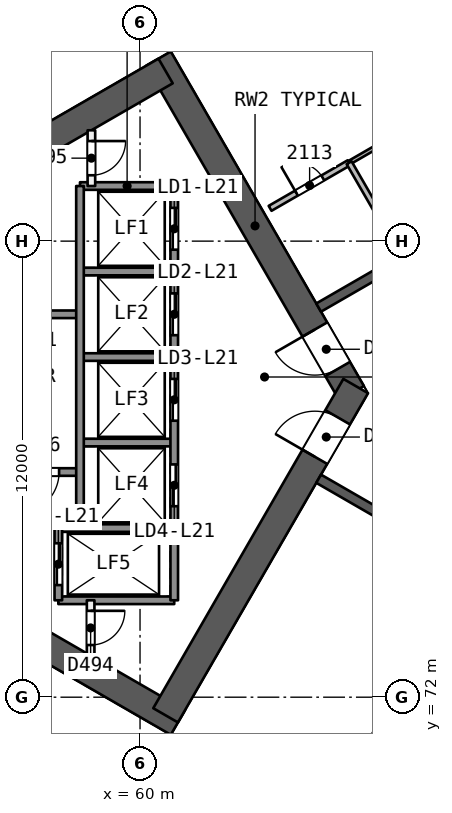
"""IFC4 building model, lengths in metres.
Left out: names, types, materials, properties, quantities, classifications, styles, units other than length and angle.
Written with IfcOpenShell. Run it as: python <this file> out.ifc"""

import sys

from ifc_helpers import new_model, si_unit, direction, frame, frame_2d, origin, place, context, subcontext, project, spatial, rectangle, extrude, element, fill, save


model = new_model("IFC4")
c1 = context("Model", 3, precision=1e-05, world=origin(), true_north=direction((0.0, 1.0)))
c2 = subcontext(c1, "Body", "Model", "MODEL_VIEW")
j1 = project(units=[si_unit("LENGTHUNIT", "METRE"), si_unit("PLANEANGLEUNIT", "RADIAN")], contexts=[c1])
p1 = place(None, origin())
s1 = spatial("IfcSite", under=j1, at=p1, CompositionType="ELEMENT")
p2 = place(p1, origin())
s2 = spatial("IfcBuilding", under=s1, at=p2, CompositionType="ELEMENT")
p3 = place(p2, frame((0.0, 0.0, 90.6)))
s3 = spatial("IfcBuildingStorey", under=s2, at=p3, CompositionType="ELEMENT", Elevation=90.6)
p4 = place(p3, frame((65.567, 80.0, 0.0), z_axis=(0.0, 0.0, 1.0), x_axis=(-0.499988615364, 0.866031976607, 0.0)))
e1 = element("IfcWall", 1, at=p4, inside=s3, PredefinedType="SHEAR", context=c2, shape_type="SweptSolid", body=[
    extrude(rectangle(XDim=10.163, YDim=0.75, at=frame_2d((5.082, 0.0))), origin(), (0.0, 0.0, 1.0), 3.7),
])
p5 = place(p4, frame((0.733, 0.0, 0.0)))
e2 = element("IfcOpeningElement", 2, at=p5, cuts=e1, PredefinedType="OPENING", context=c2, shape_type="SweptSolid", body=[
    extrude(rectangle(XDim=1.2, YDim=2.1, at=frame_2d((0.6, 1.05))), frame((0.0, 0.385, 0.0), z_axis=(0.0, -1.0, 0.0), x_axis=(1.0, 0.0, 0.0)), (0.0, 0.0, 1.0), 0.771),
])
p6 = place(p3, frame((60.673, 88.477, 0.0), z_axis=(0.0, 0.0, 1.0), x_axis=(-0.8660248072, -0.500001033313, 0.0)))
e3 = element("IfcWall", 3, at=p6, inside=s3, PredefinedType="SHEAR", context=c2, shape_type="SweptSolid", body=[
    extrude(rectangle(XDim=13.958, YDim=0.75, at=frame_2d((6.979, 0.0))), origin(), (0.0, 0.0, 1.0), 3.7),
])
p7 = place(p3, frame((48.772, 78.394, 0.0), z_axis=(0.0, 0.0, 1.0), x_axis=(0.866028339916, -0.499994914436, 0.0)))
e4 = element("IfcWall", 4, at=p7, inside=s3, PredefinedType="SHEAR", context=c2, shape_type="SweptSolid", body=[
    extrude(rectangle(XDim=14.117, YDim=0.75, at=frame_2d((7.059, 0.0))), origin(), (0.0, 0.0, 1.0), 3.7),
])
p8 = place(p3, frame((60.673, 71.523, 0.0), z_axis=(0.0, 0.0, 1.0), x_axis=(0.499997052475, 0.866027105532, 0.0)))
e5 = element("IfcWall", 5, at=p8, inside=s3, PredefinedType="SHEAR", context=c2, shape_type="SweptSolid", body=[
    extrude(rectangle(XDim=10.005, YDim=0.75, at=frame_2d((5.002, 0.0))), origin(), (0.0, 0.0, 1.0), 3.7),
])
p9 = place(p8, frame((7.855, 0.0, 0.0)))
e6 = element("IfcOpeningElement", 6, at=p9, cuts=e5, PredefinedType="OPENING", context=c2, shape_type="SweptSolid", body=[
    extrude(rectangle(XDim=1.2, YDim=2.1, at=frame_2d((0.6, 1.05))), frame((0.0, 0.385, 0.0), z_axis=(0.0, -1.0, 0.0), x_axis=(1.0, 0.0, 0.0)), (0.0, 0.0, 1.0), 0.771),
])
p10 = place(p3, frame((78.2, 90.046, 0.0), z_axis=(0.0, 0.0, 1.0), x_axis=(-0.866026492143, -0.499998114903, 0.0)))
e7 = element("IfcWall", 7, at=p10, inside=s3, PredefinedType="SHEAR", context=c2, shape_type="SweptSolid", body=[
    extrude(rectangle(XDim=15.588, YDim=0.25, at=frame_2d((7.794, 0.0))), origin(), (0.0, 0.0, 1.0), 3.2),
])
p11 = place(p10, frame((4.718, 0.0, 0.0)))
e8 = element("IfcOpeningElement", 8, at=p11, cuts=e7, PredefinedType="OPENING", context=c2, shape_type="SweptSolid", body=[
    extrude(rectangle(XDim=1.0, YDim=2.1, at=frame_2d((0.5, 1.05))), frame((0.0, 0.135, 0.0), z_axis=(0.0, -1.0, 0.0), x_axis=(1.0, 0.0, 0.0)), (0.0, 0.0, 1.0), 0.271),
])
p12 = place(p10, frame((7.194, 0.0, 0.0)))
e9 = element("IfcOpeningElement", 9, at=p12, cuts=e7, PredefinedType="OPENING", context=c2, shape_type="SweptSolid", body=[
    extrude(rectangle(XDim=1.2, YDim=2.4, at=frame_2d((0.6, 1.2))), frame((0.0, 0.135, 0.0), z_axis=(0.0, -1.0, 0.0), x_axis=(1.0, 0.0, 0.0)), (0.0, 0.0, 1.0), 0.271),
])
p13 = place(p10, frame((9.871, 0.0, 0.0)))
e10 = element("IfcOpeningElement", 10, at=p13, cuts=e7, PredefinedType="OPENING", context=c2, shape_type="SweptSolid", body=[
    extrude(rectangle(XDim=1.0, YDim=2.1, at=frame_2d((0.5, 1.05))), frame((0.0, 0.135, 0.0), z_axis=(0.0, -1.0, 0.0), x_axis=(1.0, 0.0, 0.0)), (0.0, 0.0, 1.0), 0.271),
])
p14 = place(p3, frame((64.7, 77.748, 0.0), z_axis=(0.0, 0.0, 1.0), x_axis=(0.866026492143, -0.499998114903, 0.0)))
e11 = element("IfcWall", 11, at=p14, inside=s3, PredefinedType="SHEAR", context=c2, shape_type="SweptSolid", body=[
    extrude(rectangle(XDim=15.588, YDim=0.25, at=frame_2d((7.794, 0.0))), origin(), (0.0, 0.0, 1.0), 3.2),
])
p15 = place(p14, frame((1.738, 0.0, 0.0)))
e12 = element("IfcOpeningElement", 12, at=p15, cuts=e11, PredefinedType="OPENING", context=c2, shape_type="SweptSolid", body=[
    extrude(rectangle(XDim=1.2, YDim=2.4, at=frame_2d((0.6, 1.2))), frame((0.0, 0.135, 0.0), z_axis=(0.0, -1.0, 0.0), x_axis=(1.0, 0.0, 0.0)), (0.0, 0.0, 1.0), 0.271),
])
p16 = place(p14, frame((5.785, 0.0, 0.0)))
e13 = element("IfcOpeningElement", 13, at=p16, cuts=e11, PredefinedType="OPENING", context=c2, shape_type="SweptSolid", body=[
    extrude(rectangle(XDim=0.9, YDim=2.1, at=frame_2d((0.45, 1.05))), frame((0.0, 0.135, 0.0), z_axis=(0.0, -1.0, 0.0), x_axis=(1.0, 0.0, 0.0)), (0.0, 0.0, 1.0), 0.271),
])
p17 = place(p14, frame((8.903, 0.0, 0.0)))
e14 = element("IfcOpeningElement", 14, at=p17, cuts=e11, PredefinedType="OPENING", context=c2, shape_type="SweptSolid", body=[
    extrude(rectangle(XDim=0.9, YDim=2.1, at=frame_2d((0.45, 1.05))), frame((0.0, 0.135, 0.0), z_axis=(0.0, -1.0, 0.0), x_axis=(1.0, 0.0, 0.0)), (0.0, 0.0, 1.0), 0.271),
])
p18 = place(p14, frame((12.75, 0.0, 0.0)))
e15 = element("IfcOpeningElement", 15, at=p18, cuts=e11, PredefinedType="OPENING", context=c2, shape_type="SweptSolid", body=[
    extrude(rectangle(XDim=1.0, YDim=2.1, at=frame_2d((0.5, 1.05))), frame((0.0, 0.135, 0.0), z_axis=(0.0, -1.0, 0.0), x_axis=(1.0, 0.0, 0.0)), (0.0, 0.0, 1.0), 0.271),
])
p19 = place(p3, frame((63.586, 96.652, 0.0), z_axis=(0.0, 0.0, 1.0), x_axis=(0.50000687801, -0.866021432727, 0.0)))
e16 = element("IfcWall", 16, at=p19, inside=s3, PredefinedType="PARTITIONING", context=c2, shape_type="SweptSolid", body=[
    extrude(rectangle(XDim=13.028, YDim=0.2, at=frame_2d((6.514, 0.0))), origin(), (0.0, 0.0, 1.0), 3.2),
])
p20 = place(p3, frame((63.422, 84.863, 0.0), z_axis=(0.0, 0.0, 1.0), x_axis=(0.865994240961, 0.500053971709, 0.0)))
e17 = element("IfcWall", 17, at=p20, inside=s3, PredefinedType="PARTITIONING", context=c2, shape_type="SweptSolid", body=[
    extrude(rectangle(XDim=2.401, YDim=0.15, at=frame_2d((1.201, 0.0))), origin(), (0.0, 0.0, 1.0), 3.2),
])
p21 = place(p20, frame((0.801, 0.0, 0.0)))
e18 = element("IfcOpeningElement", 18, at=p21, cuts=e17, PredefinedType="OPENING", context=c2, shape_type="SweptSolid", body=[
    extrude(rectangle(XDim=0.8, YDim=2.1, at=frame_2d((0.4, 1.05))), frame((0.0, 0.085, 0.0), z_axis=(0.0, -1.0, 0.0), x_axis=(1.0, 0.0, 0.0)), (0.0, 0.0, 1.0), 0.171),
])
p22 = place(p3, frame((65.502, 86.063, 0.0), z_axis=(0.0, 0.0, 1.0), x_axis=(0.866055983265, 0.499947031044, 0.0)))
e19 = element("IfcWall", 19, at=p22, inside=s3, PredefinedType="PARTITIONING", context=c2, shape_type="SweptSolid", body=[
    extrude(rectangle(XDim=1.6, YDim=0.1, at=frame_2d((0.8, 0.0))), origin(), (0.0, 0.0, 1.0), 3.2),
])
p23 = place(p3, frame((66.952, 83.552, 0.0), z_axis=(0.0, 0.0, 1.0), x_axis=(-0.499987231761, 0.866032775405, 0.0)))
e20 = element("IfcWall", 20, at=p23, inside=s3, PredefinedType="PARTITIONING", context=c2, shape_type="SweptSolid", body=[
    extrude(rectangle(XDim=2.9, YDim=0.15, at=frame_2d((1.45, 0.0))), origin(), (0.0, 0.0, 1.0), 3.2),
])
for number, where, z_axis, x_axis in (
    (21, (62.236, 64.128, 0.0), (0.0, 0.0, 1.0), (0.5, 0.866, 0.0)),
    (22, (64.936, 62.569, 0.0), (0.0, 0.0, 1.0), (0.5, 0.866, 0.0)),
):
    element("IfcWall", number, at=place(p3, frame(where, z_axis=z_axis, x_axis=x_axis)), inside=s3, PredefinedType="PARTITIONING", context=c2, shape_type="SweptSolid", body=[
        extrude(rectangle(XDim=13.028, YDim=0.2, at=frame_2d((6.514, 0.0))), origin(), (0.0, 0.0, 1.0), 3.2),
    ])
p24 = place(p3, frame((39.614, 82.983, 0.0), z_axis=(0.0, 0.0, 1.0), x_axis=(0.866024236478, 0.500002021829, 0.0)))
e23 = element("IfcWall", 23, at=p24, inside=s3, PredefinedType="SOLIDWALL", context=c2, shape_type="SweptSolid", body=[
    extrude(rectangle(XDim=58.307, YDim=0.3, at=frame_2d((29.154, 0.0))), origin(), (0.0, 0.0, 1.0), 3.2),
])
p25 = place(p24, frame((43.353, 0.0, 0.0)))
e24 = element("IfcOpeningElement", 24, at=p25, cuts=e23, PredefinedType="OPENING", context=c2, shape_type="SweptSolid", body=[
    extrude(rectangle(XDim=2.4, YDim=2.4, at=frame_2d((1.2, 1.2))), frame((0.0, 0.161, 0.0), z_axis=(0.0, -1.0, 0.0), x_axis=(1.0, 0.0, 0.0)), (0.0, 0.0, 1.0), 0.321),
])
p26 = place(p24, frame((12.554, 0.0, 0.0)))
e25 = element("IfcOpeningElement", 25, at=p26, cuts=e23, PredefinedType="OPENING", context=c2, shape_type="SweptSolid", body=[
    extrude(rectangle(XDim=2.4, YDim=2.4, at=frame_2d((1.2, 1.2))), frame((0.0, 0.161, 0.0), z_axis=(0.0, -1.0, 0.0), x_axis=(1.0, 0.0, 0.0)), (0.0, 0.0, 1.0), 0.321),
])
p27 = place(p24, frame((27.954, 0.0, 0.0)))
e26 = element("IfcOpeningElement", 26, at=p27, cuts=e23, PredefinedType="OPENING", context=c2, shape_type="SweptSolid", body=[
    extrude(rectangle(XDim=2.4, YDim=2.4, at=frame_2d((1.2, 1.2))), frame((0.0, 0.161, 0.0), z_axis=(0.0, -1.0, 0.0), x_axis=(1.0, 0.0, 0.0)), (0.0, 0.0, 1.0), 0.321),
])
p28 = place(p3, frame((90.11, 47.863, 0.0), z_axis=(0.0, 0.0, 1.0), x_axis=(-0.866024236478, 0.500002021829, 0.0)))
e27 = element("IfcWall", 27, at=p28, inside=s3, PredefinedType="SOLIDWALL", context=c2, shape_type="SweptSolid", body=[
    extrude(rectangle(XDim=58.307, YDim=0.3, at=frame_2d((29.154, 0.0))), origin(), (0.0, 0.0, 1.0), 3.2),
])
p29 = place(p28, frame((44.133, 0.0, 0.0)))
e28 = element("IfcOpeningElement", 28, at=p29, cuts=e27, PredefinedType="OPENING", context=c2, shape_type="SweptSolid", body=[
    extrude(rectangle(XDim=2.4, YDim=2.4, at=frame_2d((1.2, 1.2))), frame((0.0, 0.161, 0.0), z_axis=(0.0, -1.0, 0.0), x_axis=(1.0, 0.0, 0.0)), (0.0, 0.0, 1.0), 0.321),
])
p30 = place(p28, frame((22.498, 0.0, 0.0)))
e29 = element("IfcOpeningElement", 29, at=p30, cuts=e27, PredefinedType="OPENING", context=c2, shape_type="SweptSolid", body=[
    extrude(rectangle(XDim=2.4, YDim=2.4, at=frame_2d((1.2, 1.2))), frame((0.0, 0.161, 0.0), z_axis=(0.0, -1.0, 0.0), x_axis=(1.0, 0.0, 0.0)), (0.0, 0.0, 1.0), 0.321),
])
p31 = place(p28, frame((10.65, 0.0, 0.0)))
e30 = element("IfcOpeningElement", 30, at=p31, cuts=e27, PredefinedType="OPENING", context=c2, shape_type="SweptSolid", body=[
    extrude(rectangle(XDim=2.4, YDim=2.4, at=frame_2d((1.2, 1.2))), frame((0.0, 0.161, 0.0), z_axis=(0.0, -1.0, 0.0), x_axis=(1.0, 0.0, 0.0)), (0.0, 0.0, 1.0), 0.321),
])
p32 = place(p28, frame((29.812, 0.0, 0.9)))
e31 = element("IfcOpeningElement", 31, at=p32, cuts=e27, PredefinedType="OPENING", context=c2, shape_type="SweptSolid", body=[
    extrude(rectangle(XDim=1.8, YDim=1.5, at=frame_2d((0.9, 0.75))), frame((0.0, 0.161, 0.0), z_axis=(0.0, -1.0, 0.0), x_axis=(1.0, 0.0, 0.0)), (0.0, 0.0, 1.0), 0.321),
])
p33 = place(p28, frame((26.695, 0.0, 0.9)))
e32 = element("IfcOpeningElement", 32, at=p33, cuts=e27, PredefinedType="OPENING", context=c2, shape_type="SweptSolid", body=[
    extrude(rectangle(XDim=1.8, YDim=1.5, at=frame_2d((0.9, 0.75))), frame((0.0, 0.161, 0.0), z_axis=(0.0, -1.0, 0.0), x_axis=(1.0, 0.0, 0.0)), (0.0, 0.0, 1.0), 0.321),
])
for number, where, z_axis, x_axis in (
    (33, (60.9, 85.45, 0.0), (0.0, 0.0, 1.0), (-1.0, 0.0, 0.0)),
    (34, (60.9, 83.2, 0.0), (0.0, 0.0, 1.0), (-1.0, 0.0, 0.0)),
):
    element("IfcWall", number, at=place(p3, frame(where, z_axis=z_axis, x_axis=x_axis)), inside=s3, PredefinedType="SOLIDWALL", context=c2, shape_type="SweptSolid", body=[
        extrude(rectangle(XDim=2.48, YDim=0.2, at=frame_2d((1.24, 0.0))), origin(), (0.0, 0.0, 1.0), 3.2),
    ])
p34 = place(p3, frame((58.42, 82.075, 0.0), z_axis=(0.0, 0.0, 1.0), x_axis=(-1.0, 0.0, 0.0)))
e35 = element("IfcWall", 35, at=p34, inside=s3, PredefinedType="SOLIDWALL", context=c2, shape_type="SweptSolid", body=[
    extrude(rectangle(XDim=7.7, YDim=0.2, at=frame_2d((3.85, 0.0))), origin(), (0.0, 0.0, 1.0), 3.2),
])
for number, where, z_axis, x_axis in (
    (36, (60.9, 80.95, 0.0), (0.0, 0.0, 1.0), (-1.0, 0.0, 0.0)),
    (37, (60.9, 78.7, 0.0), (0.0, 0.0, 1.0), (-1.0, 0.0, 0.0)),
):
    element("IfcWall", number, at=place(p3, frame(where, z_axis=z_axis, x_axis=x_axis)), inside=s3, PredefinedType="SOLIDWALL", context=c2, shape_type="SweptSolid", body=[
        extrude(rectangle(XDim=2.48, YDim=0.2, at=frame_2d((1.24, 0.0))), origin(), (0.0, 0.0, 1.0), 3.2),
    ])
p35 = place(p3, frame((58.42, 77.925, 0.0), z_axis=(0.0, 0.0, 1.0), x_axis=(-1.0, 0.0, 0.0)))
e38 = element("IfcWall", 38, at=p35, inside=s3, PredefinedType="SOLIDWALL", context=c2, shape_type="SweptSolid", body=[
    extrude(rectangle(XDim=7.7, YDim=0.2, at=frame_2d((3.85, 0.0))), origin(), (0.0, 0.0, 1.0), 3.2),
])
p36 = place(p35, frame((0.55, 0.0, 0.0)))
e39 = element("IfcOpeningElement", 39, at=p36, cuts=e38, PredefinedType="OPENING", context=c2, shape_type="SweptSolid", body=[
    extrude(rectangle(XDim=1.1, YDim=2.1, at=frame_2d((0.55, 1.05))), frame((0.0, 0.11, 0.0), z_axis=(0.0, -1.0, 0.0), x_axis=(1.0, 0.0, 0.0)), (0.0, 0.0, 1.0), 0.221),
])
for number, where, z_axis, x_axis in (
    (40, (60.9, 76.45, 0.0), (0.0, 0.0, 1.0), (-1.0, 0.0, 0.0)),
    (41, (60.9, 74.55, 0.0), (0.0, 0.0, 1.0), (-1.0, 0.0, 0.0)),
):
    element("IfcWall", number, at=place(p3, frame(where, z_axis=z_axis, x_axis=x_axis)), inside=s3, PredefinedType="SOLIDWALL", context=c2, shape_type="SweptSolid", body=[
        extrude(rectangle(XDim=3.05, YDim=0.2, at=frame_2d((1.525, 0.0))), origin(), (0.0, 0.0, 1.0), 3.2),
    ])
p37 = place(p3, frame((60.9, 85.45, 0.0), z_axis=(0.0, 0.0, 1.0), x_axis=(0.0, -1.0, 0.0)))
e42 = element("IfcWall", 42, at=p37, inside=s3, PredefinedType="SOLIDWALL", context=c2, shape_type="SweptSolid", body=[
    extrude(rectangle(XDim=10.9, YDim=0.2, at=frame_2d((5.45, 0.0))), origin(), (0.0, 0.0, 1.0), 3.2),
])
p38 = place(p37, frame((0.575, 0.0, 0.0)))
e43 = element("IfcOpeningElement", 43, at=p38, cuts=e42, PredefinedType="OPENING", context=c2, shape_type="SweptSolid", body=[
    extrude(rectangle(XDim=1.1, YDim=2.1, at=frame_2d((0.55, 1.05))), frame((0.0, 0.11, 0.0), z_axis=(0.0, -1.0, 0.0), x_axis=(1.0, 0.0, 0.0)), (0.0, 0.0, 1.0), 0.221),
])
p39 = place(p37, frame((2.825, 0.0, 0.0)))
e44 = element("IfcOpeningElement", 44, at=p39, cuts=e42, PredefinedType="OPENING", context=c2, shape_type="SweptSolid", body=[
    extrude(rectangle(XDim=1.1, YDim=2.1, at=frame_2d((0.55, 1.05))), frame((0.0, 0.11, 0.0), z_axis=(0.0, -1.0, 0.0), x_axis=(1.0, 0.0, 0.0)), (0.0, 0.0, 1.0), 0.221),
])
p40 = place(p37, frame((5.075, 0.0, 0.0)))
e45 = element("IfcOpeningElement", 45, at=p40, cuts=e42, PredefinedType="OPENING", context=c2, shape_type="SweptSolid", body=[
    extrude(rectangle(XDim=1.1, YDim=2.1, at=frame_2d((0.55, 1.05))), frame((0.0, 0.11, 0.0), z_axis=(0.0, -1.0, 0.0), x_axis=(1.0, 0.0, 0.0)), (0.0, 0.0, 1.0), 0.221),
])
p41 = place(p37, frame((7.325, 0.0, 0.0)))
e46 = element("IfcOpeningElement", 46, at=p41, cuts=e42, PredefinedType="OPENING", context=c2, shape_type="SweptSolid", body=[
    extrude(rectangle(XDim=1.1, YDim=2.1, at=frame_2d((0.55, 1.05))), frame((0.0, 0.11, 0.0), z_axis=(0.0, -1.0, 0.0), x_axis=(1.0, 0.0, 0.0)), (0.0, 0.0, 1.0), 0.221),
])
p42 = place(p3, frame((58.72, 86.917, 0.0), z_axis=(0.0, 0.0, 1.0), x_axis=(0.0, -1.0, 0.0)))
e47 = element("IfcWall", 47, at=p42, inside=s3, PredefinedType="PARTITIONING", context=c2, shape_type="SweptSolid", body=[
    extrude(rectangle(XDim=1.467, YDim=0.2, at=frame_2d((0.733, 0.0))), origin(), (0.0, 0.0, 1.0), 3.2),
])
p43 = place(p42, frame((0.283, 0.0, 0.0)))
e48 = element("IfcOpeningElement", 48, at=p43, cuts=e47, PredefinedType="OPENING", context=c2, shape_type="SweptSolid", body=[
    extrude(rectangle(XDim=0.9, YDim=2.1, at=frame_2d((0.45, 1.05))), frame((0.0, 0.11, 0.0), z_axis=(0.0, -1.0, 0.0), x_axis=(1.0, 0.0, 0.0)), (0.0, 0.0, 1.0), 0.221),
])
p44 = place(p3, frame((58.7, 74.55, 0.0), z_axis=(0.0, 0.0, 1.0), x_axis=(0.0, -1.0, 0.0)))
e49 = element("IfcWall", 49, at=p44, inside=s3, PredefinedType="PARTITIONING", context=c2, shape_type="SweptSolid", body=[
    extrude(rectangle(XDim=1.455, YDim=0.2, at=frame_2d((0.728, 0.0))), origin(), (0.0, 0.0, 1.0), 3.2),
])
p45 = place(p44, frame((0.278, 0.0, 0.0)))
e50 = element("IfcOpeningElement", 50, at=p45, cuts=e49, PredefinedType="OPENING", context=c2, shape_type="SweptSolid", body=[
    extrude(rectangle(XDim=0.9, YDim=2.1, at=frame_2d((0.45, 1.05))), frame((0.0, 0.11, 0.0), z_axis=(0.0, -1.0, 0.0), x_axis=(1.0, 0.0, 0.0)), (0.0, 0.0, 1.0), 0.221),
])
p46 = place(p3, frame((58.42, 85.45, 0.0), z_axis=(0.0, 0.0, 1.0), x_axis=(0.0, -1.0, 0.0)))
e51 = element("IfcWall", 51, at=p46, inside=s3, PredefinedType="SOLIDWALL", context=c2, shape_type="SweptSolid", body=[
    extrude(rectangle(XDim=9.0, YDim=0.2, at=frame_2d((4.5, 0.0))), origin(), (0.0, 0.0, 1.0), 3.2),
])
p47 = place(p3, frame((57.85, 76.45, 0.0), z_axis=(0.0, 0.0, 1.0), x_axis=(0.0, -1.0, 0.0)))
e52 = element("IfcWall", 52, at=p47, inside=s3, PredefinedType="SOLIDWALL", context=c2, shape_type="SweptSolid", body=[
    extrude(rectangle(XDim=1.9, YDim=0.2, at=frame_2d((0.95, 0.0))), origin(), (0.0, 0.0, 1.0), 3.2),
])
p48 = place(p47, frame((0.4, 0.0, 0.0)))
e53 = element("IfcOpeningElement", 53, at=p48, cuts=e52, PredefinedType="OPENING", context=c2, shape_type="SweptSolid", body=[
    extrude(rectangle(XDim=1.1, YDim=2.1, at=frame_2d((0.55, 1.05))), frame((0.0, 0.11, 0.0), z_axis=(0.0, -1.0, 0.0), x_axis=(1.0, 0.0, 0.0)), (0.0, 0.0, 1.0), 0.221),
])
p49 = place(p21, origin())
e54 = element("IfcDoor", 54, at=p49, inside=s3, OperationType="SINGLE_SWING_LEFT", PredefinedType="NOTDEFINED", context=c2, shape_type="SweptSolid", body=[
    extrude(rectangle(XDim=0.8, YDim=2.1, at=frame_2d((0.4, 1.05))), frame((0.0, 0.025, 0.0), z_axis=(0.0, -1.0, 0.0), x_axis=(1.0, 0.0, 0.0)), (0.0, 0.0, 1.0), 0.05),
])
fill(e18, e54)
p50 = place(p5, origin())
e55 = element("IfcDoor", 55, at=p50, inside=s3, OperationType="SINGLE_SWING_RIGHT", PredefinedType="NOTDEFINED", context=c2, shape_type="SweptSolid", body=[
    extrude(rectangle(XDim=1.2, YDim=2.1, at=frame_2d((0.6, 1.05))), frame((0.0, 0.025, 0.0), z_axis=(0.0, -1.0, 0.0), x_axis=(1.0, 0.0, 0.0)), (0.0, 0.0, 1.0), 0.05),
])
fill(e2, e55)
p51 = place(p9, origin())
e56 = element("IfcDoor", 56, at=p51, inside=s3, OperationType="SINGLE_SWING_LEFT", PredefinedType="NOTDEFINED", context=c2, shape_type="SweptSolid", body=[
    extrude(rectangle(XDim=1.2, YDim=2.1, at=frame_2d((0.6, 1.05))), frame((0.0, 0.025, 0.0), z_axis=(0.0, -1.0, 0.0), x_axis=(1.0, 0.0, 0.0)), (0.0, 0.0, 1.0), 0.05),
])
fill(e6, e56)
p52 = place(p38, origin())
e57 = element("IfcDoor", 57, at=p52, inside=s3, OperationType="SLIDING_TO_RIGHT", PredefinedType="NOTDEFINED", context=c2, shape_type="SweptSolid", body=[
    extrude(rectangle(XDim=1.1, YDim=2.1, at=frame_2d((0.55, 1.05))), frame((0.0, 0.025, 0.0), z_axis=(0.0, -1.0, 0.0), x_axis=(1.0, 0.0, 0.0)), (0.0, 0.0, 1.0), 0.05),
])
fill(e43, e57)
p53 = place(p39, origin())
e58 = element("IfcDoor", 58, at=p53, inside=s3, OperationType="SLIDING_TO_LEFT", PredefinedType="NOTDEFINED", context=c2, shape_type="SweptSolid", body=[
    extrude(rectangle(XDim=1.1, YDim=2.1, at=frame_2d((0.55, 1.05))), frame((0.0, 0.025, 0.0), z_axis=(0.0, -1.0, 0.0), x_axis=(1.0, 0.0, 0.0)), (0.0, 0.0, 1.0), 0.05),
])
fill(e44, e58)
p54 = place(p40, origin())
e59 = element("IfcDoor", 59, at=p54, inside=s3, OperationType="SLIDING_TO_RIGHT", PredefinedType="NOTDEFINED", context=c2, shape_type="SweptSolid", body=[
    extrude(rectangle(XDim=1.1, YDim=2.1, at=frame_2d((0.55, 1.05))), frame((0.0, 0.025, 0.0), z_axis=(0.0, -1.0, 0.0), x_axis=(1.0, 0.0, 0.0)), (0.0, 0.0, 1.0), 0.05),
])
fill(e45, e59)
p55 = place(p41, origin())
e60 = element("IfcDoor", 60, at=p55, inside=s3, OperationType="SLIDING_TO_LEFT", PredefinedType="NOTDEFINED", context=c2, shape_type="SweptSolid", body=[
    extrude(rectangle(XDim=1.1, YDim=2.1, at=frame_2d((0.55, 1.05))), frame((0.0, 0.025, 0.0), z_axis=(0.0, -1.0, 0.0), x_axis=(1.0, 0.0, 0.0)), (0.0, 0.0, 1.0), 0.05),
])
fill(e46, e60)
p56 = place(p48, origin())
e61 = element("IfcDoor", 61, at=p56, inside=s3, OperationType="SLIDING_TO_RIGHT", PredefinedType="NOTDEFINED", context=c2, shape_type="SweptSolid", body=[
    extrude(rectangle(XDim=1.1, YDim=2.1, at=frame_2d((0.55, 1.05))), frame((0.0, 0.025, 0.0), z_axis=(0.0, -1.0, 0.0), x_axis=(1.0, 0.0, 0.0)), (0.0, 0.0, 1.0), 0.05),
])
fill(e53, e61)
p57 = place(p45, origin())
e62 = element("IfcDoor", 62, at=p57, inside=s3, OperationType="SINGLE_SWING_LEFT", PredefinedType="NOTDEFINED", context=c2, shape_type="SweptSolid", body=[
    extrude(rectangle(XDim=0.9, YDim=2.1, at=frame_2d((0.45, 1.05))), frame((0.0, 0.025, 0.0), z_axis=(0.0, -1.0, 0.0), x_axis=(1.0, 0.0, 0.0)), (0.0, 0.0, 1.0), 0.05),
])
fill(e50, e62)
p58 = place(p43, origin())
e63 = element("IfcDoor", 63, at=p58, inside=s3, OperationType="SINGLE_SWING_LEFT", PredefinedType="NOTDEFINED", context=c2, shape_type="SweptSolid", body=[
    extrude(rectangle(XDim=0.9, YDim=2.1, at=frame_2d((0.45, 1.05))), frame((0.0, 0.025, 0.0), z_axis=(0.0, -1.0, 0.0), x_axis=(1.0, 0.0, 0.0)), (0.0, 0.0, 1.0), 0.05),
])
fill(e48, e63)
p59 = place(p36, origin())
e64 = element("IfcDoor", 64, at=p59, inside=s3, OperationType="SINGLE_SWING_RIGHT", PredefinedType="NOTDEFINED", context=c2, shape_type="SweptSolid", body=[
    extrude(rectangle(XDim=1.1, YDim=2.1, at=frame_2d((0.55, 1.05))), frame((0.0, 0.025, 0.0), z_axis=(0.0, -1.0, 0.0), x_axis=(1.0, 0.0, 0.0)), (0.0, 0.0, 1.0), 0.05),
])
fill(e39, e64)
save(model, sys.argv[1])
